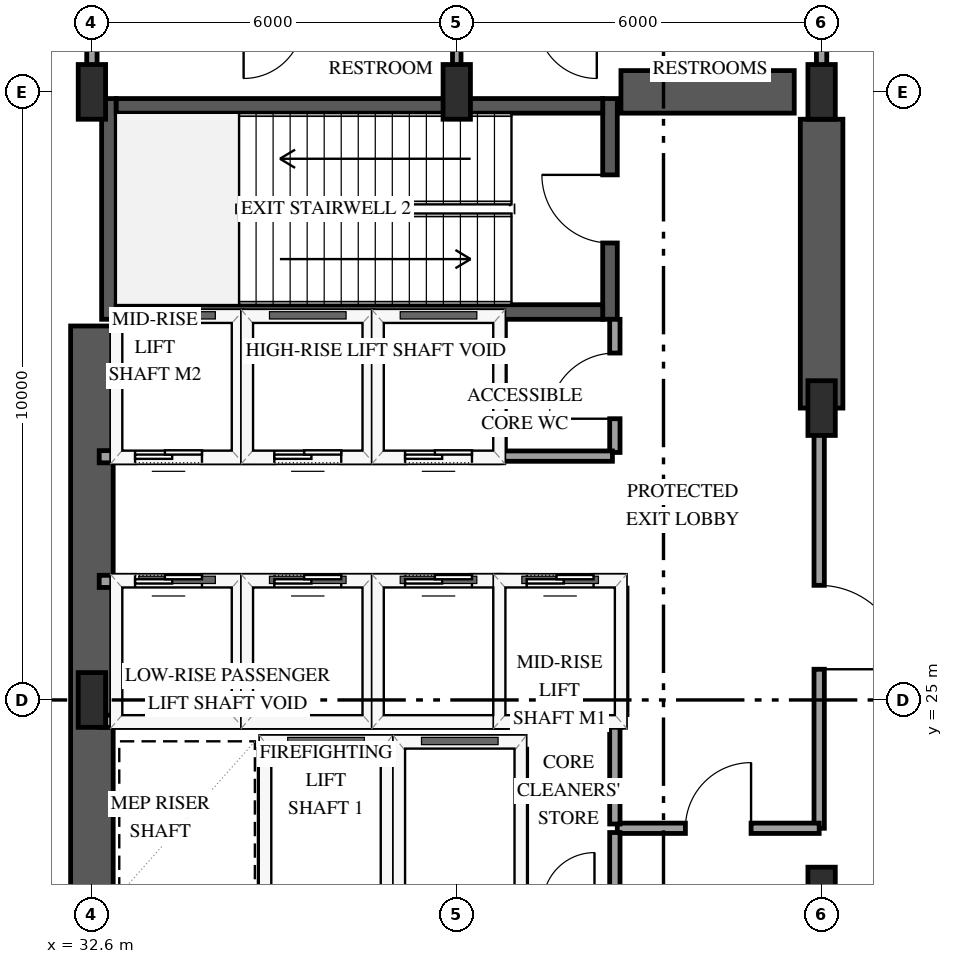
"""IFC4 building model, lengths in metres.
Left out: names, types, materials, properties, quantities, classifications, styles, units other than length and angle.
Written with IfcOpenShell. Run it as: python <this file> out.ifc"""

import sys

from ifc_helpers import new_model, si_unit, direction, frame, frame_2d, origin, origin_2d, place, context, subcontext, project, spatial, rectangle, extrude, element, fill, save


model = new_model("IFC4")
c1 = context("Model", 3, precision=1e-05, world=origin(), true_north=direction((0.0, 1.0)))
c2 = subcontext(c1, "Body", "Model", "MODEL_VIEW")
j1 = project(units=[si_unit("LENGTHUNIT", "METRE"), si_unit("PLANEANGLEUNIT", "RADIAN")], contexts=[c1])
p1 = place(None, origin())
s1 = spatial("IfcSite", under=j1, at=p1, CompositionType="ELEMENT")
p2 = place(p1, origin())
s2 = spatial("IfcBuilding", under=s1, at=p2, CompositionType="ELEMENT")
p3 = place(p2, origin())
s3 = spatial("IfcBuildingStorey", under=s2, at=p3, CompositionType="ELEMENT", Elevation=0.0)
p4 = place(p3, frame((32.88, 31.26, 0.0), z_axis=(0.0, 0.0, 1.0), x_axis=(0.0, 1.0, 0.0)))
e1 = element("IfcWall", 1, at=p4, inside=s3, PredefinedType="SHEAR", context=c2, shape_type="SweptSolid", body=[
    extrude(rectangle(XDim=3.63, YDim=0.24, at=frame_2d((1.815, 0.0))), origin(), (0.0, 0.0, 1.0), 6.0),
])
p5 = place(p3, frame((41.12, 31.26, 0.0), z_axis=(0.0, 0.0, 1.0), x_axis=(0.0, 1.0, 0.0)))
e2 = element("IfcWall", 2, at=p5, inside=s3, PredefinedType="SHEAR", context=c2, shape_type="SweptSolid", body=[
    extrude(rectangle(XDim=3.63, YDim=0.24, at=frame_2d((1.815, 0.0))), origin(), (0.0, 0.0, 1.0), 6.0),
])
p6 = place(p5, frame((1.255, 0.0, 0.0)))
e3 = element("IfcOpeningElement", 3, at=p6, cuts=e2, PredefinedType="OPENING", context=c2, shape_type="SweptSolid", body=[
    extrude(rectangle(XDim=1.12, YDim=2.15, at=frame_2d((0.56, 1.075))), frame((0.0, 0.13, 0.0), z_axis=(0.0, -1.0, 0.0), x_axis=(1.0, 0.0, 0.0)), (0.0, 0.0, 1.0), 0.26),
])
for number, where, z_axis, x_axis in (
    (4, (33.0, 31.38, 0.0), (0.0, 0.0, 1.0), (1.0, 0.0, 0.0)),
    (5, (33.0, 34.77, 0.0), (0.0, 0.0, 1.0), (1.0, 0.0, 0.0)),
):
    element("IfcWall", number, at=place(p3, frame(where, z_axis=z_axis, x_axis=x_axis)), inside=s3, PredefinedType="SHEAR", context=c2, shape_type="SweptSolid", body=[
        extrude(rectangle(XDim=8.0, YDim=0.24, at=frame_2d((4.0, 0.0))), origin(), (0.0, 0.0, 1.0), 6.0),
    ])
p7 = place(p3, frame((32.6, 18.85, 0.0), z_axis=(0.0, 0.0, 1.0), x_axis=(0.0, 1.0, 0.0)))
e6 = element("IfcWall", 6, at=p7, inside=s3, PredefinedType="SHEAR", context=c2, shape_type="SweptSolid", body=[
    extrude(rectangle(XDim=12.3, YDim=0.7, at=frame_2d((6.15, 0.0))), origin(), (0.0, 0.0, 1.0), 6.0),
])
p8 = place(p3, frame((41.3, 35.0, 0.0), z_axis=(0.0, 0.0, 1.0), x_axis=(1.0, 0.0, 0.0)))
e7 = element("IfcWall", 7, at=p8, inside=s3, PredefinedType="SHEAR", context=c2, shape_type="SweptSolid", body=[
    extrude(rectangle(XDim=2.85, YDim=0.7, at=frame_2d((1.425, 0.0))), origin(), (0.0, 0.0, 1.0), 6.0),
])
p9 = place(p3, frame((44.6, 29.8, 0.0), z_axis=(0.0, 0.0, 1.0), x_axis=(0.0, 1.0, 0.0)))
e8 = element("IfcWall", 8, at=p9, inside=s3, PredefinedType="SHEAR", context=c2, shape_type="SweptSolid", body=[
    extrude(rectangle(XDim=4.75, YDim=0.7, at=frame_2d((2.375, 0.0))), origin(), (0.0, 0.0, 1.0), 6.0),
])
for number, where, z_axis, x_axis in (
    (9, (32.6, 25.0, 0.0), (0.0, 0.0, 1.0), (1.0, 0.0, 0.0)),
    (10, (32.6, 35.0, 0.0), (0.0, 0.0, 1.0), (1.0, 0.0, 0.0)),
    (11, (38.6, 35.0, 0.0), (0.0, 0.0, 1.0), (1.0, 0.0, 0.0)),
    (12, (44.6, 21.8, 0.0), (0.0, 0.0, 1.0), (1.0, 0.0, 0.0)),
    (13, (44.6, 29.8, 0.0), (0.0, 0.0, 1.0), (1.0, 0.0, 0.0)),
    (14, (44.6, 35.0, 0.0), (0.0, 0.0, 1.0), (1.0, 0.0, 0.0)),
):
    element("IfcColumn", number, at=place(p3, frame(where, z_axis=z_axis, x_axis=x_axis)), inside=s3, PredefinedType="PILASTER", context=c2, shape_type="SweptSolid", body=[
        extrude(rectangle(XDim=0.45, YDim=0.9, at=origin_2d()), origin(), (0.0, 0.0, 1.0), 6.0),
    ])
p10 = place(p3, frame((35.45, 24.3, 0.0), z_axis=(0.0, 0.0, 1.0), x_axis=(1.0, 0.0, 0.0)))
e15 = element("IfcWall", 15, at=p10, inside=s3, PredefinedType="SOLIDWALL", context=c2, shape_type="SweptSolid", body=[
    extrude(rectangle(XDim=2.0, YDim=0.2, at=frame_2d((1.0, 0.0))), origin(), (0.0, 0.0, 1.0), 5.68),
])
for number, where, z_axis, x_axis in (
    (16, (35.45, 21.81, 0.0), (0.0, 0.0, 1.0), (0.0, 1.0, 0.0)),
    (17, (37.45, 21.81, 0.0), (0.0, 0.0, 1.0), (0.0, 1.0, 0.0)),
):
    element("IfcWall", number, at=place(p3, frame(where, z_axis=z_axis, x_axis=x_axis)), inside=s3, PredefinedType="SOLIDWALL", context=c2, shape_type="SweptSolid", body=[
        extrude(rectangle(XDim=2.38, YDim=0.2, at=frame_2d((1.19, 0.0))), origin(), (0.0, 0.0, 1.0), 5.68),
    ])
p11 = place(p3, frame((37.65, 24.3, 0.0), z_axis=(0.0, 0.0, 1.0), x_axis=(1.0, 0.0, 0.0)))
e18 = element("IfcWall", 18, at=p11, inside=s3, PredefinedType="SOLIDWALL", context=c2, shape_type="SweptSolid", body=[
    extrude(rectangle(XDim=2.0, YDim=0.2, at=frame_2d((1.0, 0.0))), origin(), (0.0, 0.0, 1.0), 5.68),
])
p12 = place(p3, frame((39.65, 21.81, 0.0), z_axis=(0.0, 0.0, 1.0), x_axis=(0.0, 1.0, 0.0)))
e19 = element("IfcWall", 19, at=p12, inside=s3, PredefinedType="SOLIDWALL", context=c2, shape_type="SweptSolid", body=[
    extrude(rectangle(XDim=2.38, YDim=0.2, at=frame_2d((1.19, 0.0))), origin(), (0.0, 0.0, 1.0), 5.68),
])
p13 = place(p3, frame((32.72, 24.65, 0.0), z_axis=(0.0, 0.0, 1.0), x_axis=(1.0, 0.0, 0.0)))
e20 = element("IfcWall", 20, at=p13, inside=s3, PredefinedType="SOLIDWALL", context=c2, shape_type="SweptSolid", body=[
    extrude(rectangle(XDim=2.28, YDim=0.2, at=frame_2d((1.14, 0.0))), origin(), (0.0, 0.0, 1.0), 5.68),
])
p14 = place(p3, frame((32.72, 26.95, 0.0), z_axis=(0.0, 0.0, 1.0), x_axis=(1.0, 0.0, 0.0)))
e21 = element("IfcWall", 21, at=p14, inside=s3, PredefinedType="SOLIDWALL", context=c2, shape_type="SweptSolid", body=[
    extrude(rectangle(XDim=2.28, YDim=0.2, at=frame_2d((1.14, 0.0))), origin(), (0.0, 0.0, 1.0), 5.68),
])
p15 = place(p14, frame((0.59, 0.0, 0.0)))
e22 = element("IfcOpeningElement", 22, at=p15, cuts=e21, PredefinedType="OPENING", context=c2, shape_type="SweptSolid", body=[
    extrude(rectangle(XDim=1.1, YDim=2.15, at=frame_2d((0.55, 1.075))), frame((0.0, 0.11, 0.0), z_axis=(0.0, -1.0, 0.0), x_axis=(1.0, 0.0, 0.0)), (0.0, 0.0, 1.0), 0.22),
])
p16 = place(p3, frame((35.0, 24.76, 0.0), z_axis=(0.0, 0.0, 1.0), x_axis=(0.0, 1.0, 0.0)))
e23 = element("IfcWall", 23, at=p16, inside=s3, PredefinedType="SOLIDWALL", context=c2, shape_type="SweptSolid", body=[
    extrude(rectangle(XDim=2.08, YDim=0.2, at=frame_2d((1.04, 0.0))), origin(), (0.0, 0.0, 1.0), 5.68),
])
p17 = place(p3, frame((35.15, 24.65, 0.0), z_axis=(0.0, 0.0, 1.0), x_axis=(1.0, 0.0, 0.0)))
e24 = element("IfcWall", 24, at=p17, inside=s3, PredefinedType="SOLIDWALL", context=c2, shape_type="SweptSolid", body=[
    extrude(rectangle(XDim=2.0, YDim=0.2, at=frame_2d((1.0, 0.0))), origin(), (0.0, 0.0, 1.0), 5.68),
])
p18 = place(p3, frame((35.15, 26.95, 0.0), z_axis=(0.0, 0.0, 1.0), x_axis=(1.0, 0.0, 0.0)))
e25 = element("IfcWall", 25, at=p18, inside=s3, PredefinedType="SOLIDWALL", context=c2, shape_type="SweptSolid", body=[
    extrude(rectangle(XDim=2.0, YDim=0.2, at=frame_2d((1.0, 0.0))), origin(), (0.0, 0.0, 1.0), 5.68),
])
p19 = place(p18, frame((0.45, 0.0, 0.0)))
e26 = element("IfcOpeningElement", 26, at=p19, cuts=e25, PredefinedType="OPENING", context=c2, shape_type="SweptSolid", body=[
    extrude(rectangle(XDim=1.1, YDim=2.15, at=frame_2d((0.55, 1.075))), frame((0.0, 0.11, 0.0), z_axis=(0.0, -1.0, 0.0), x_axis=(1.0, 0.0, 0.0)), (0.0, 0.0, 1.0), 0.22),
])
p20 = place(p3, frame((37.15, 24.76, 0.0), z_axis=(0.0, 0.0, 1.0), x_axis=(0.0, 1.0, 0.0)))
e27 = element("IfcWall", 27, at=p20, inside=s3, PredefinedType="SOLIDWALL", context=c2, shape_type="SweptSolid", body=[
    extrude(rectangle(XDim=2.08, YDim=0.2, at=frame_2d((1.04, 0.0))), origin(), (0.0, 0.0, 1.0), 5.68),
])
p21 = place(p3, frame((37.3, 24.65, 0.0), z_axis=(0.0, 0.0, 1.0), x_axis=(1.0, 0.0, 0.0)))
e28 = element("IfcWall", 28, at=p21, inside=s3, PredefinedType="SOLIDWALL", context=c2, shape_type="SweptSolid", body=[
    extrude(rectangle(XDim=2.0, YDim=0.2, at=frame_2d((1.0, 0.0))), origin(), (0.0, 0.0, 1.0), 5.68),
])
p22 = place(p3, frame((37.3, 26.95, 0.0), z_axis=(0.0, 0.0, 1.0), x_axis=(1.0, 0.0, 0.0)))
e29 = element("IfcWall", 29, at=p22, inside=s3, PredefinedType="SOLIDWALL", context=c2, shape_type="SweptSolid", body=[
    extrude(rectangle(XDim=2.0, YDim=0.2, at=frame_2d((1.0, 0.0))), origin(), (0.0, 0.0, 1.0), 5.68),
])
p23 = place(p22, frame((0.45, 0.0, 0.0)))
e30 = element("IfcOpeningElement", 30, at=p23, cuts=e29, PredefinedType="OPENING", context=c2, shape_type="SweptSolid", body=[
    extrude(rectangle(XDim=1.1, YDim=2.15, at=frame_2d((0.55, 1.075))), frame((0.0, 0.11, 0.0), z_axis=(0.0, -1.0, 0.0), x_axis=(1.0, 0.0, 0.0)), (0.0, 0.0, 1.0), 0.22),
])
p24 = place(p3, frame((39.3, 24.76, 0.0), z_axis=(0.0, 0.0, 1.0), x_axis=(0.0, 1.0, 0.0)))
e31 = element("IfcWall", 31, at=p24, inside=s3, PredefinedType="SOLIDWALL", context=c2, shape_type="SweptSolid", body=[
    extrude(rectangle(XDim=2.08, YDim=0.2, at=frame_2d((1.04, 0.0))), origin(), (0.0, 0.0, 1.0), 5.68),
])
p25 = place(p3, frame((39.3, 24.65, 0.0), z_axis=(0.0, 0.0, 1.0), x_axis=(1.0, 0.0, 0.0)))
e32 = element("IfcWall", 32, at=p25, inside=s3, PredefinedType="SOLIDWALL", context=c2, shape_type="SweptSolid", body=[
    extrude(rectangle(XDim=2.0, YDim=0.2, at=frame_2d((1.0, 0.0))), origin(), (0.0, 0.0, 1.0), 5.68),
])
p26 = place(p3, frame((39.3, 26.95, 0.0), z_axis=(0.0, 0.0, 1.0), x_axis=(1.0, 0.0, 0.0)))
e33 = element("IfcWall", 33, at=p26, inside=s3, PredefinedType="SOLIDWALL", context=c2, shape_type="SweptSolid", body=[
    extrude(rectangle(XDim=2.0, YDim=0.2, at=frame_2d((1.0, 0.0))), origin(), (0.0, 0.0, 1.0), 5.68),
])
p27 = place(p26, frame((0.45, 0.0, 0.0)))
e34 = element("IfcOpeningElement", 34, at=p27, cuts=e33, PredefinedType="OPENING", context=c2, shape_type="SweptSolid", body=[
    extrude(rectangle(XDim=1.1, YDim=2.15, at=frame_2d((0.55, 1.075))), frame((0.0, 0.11, 0.0), z_axis=(0.0, -1.0, 0.0), x_axis=(1.0, 0.0, 0.0)), (0.0, 0.0, 1.0), 0.22),
])
p28 = place(p3, frame((41.3, 24.76, 0.0), z_axis=(0.0, 0.0, 1.0), x_axis=(0.0, 1.0, 0.0)))
e35 = element("IfcWall", 35, at=p28, inside=s3, PredefinedType="SOLIDWALL", context=c2, shape_type="SweptSolid", body=[
    extrude(rectangle(XDim=2.08, YDim=0.2, at=frame_2d((1.04, 0.0))), origin(), (0.0, 0.0, 1.0), 5.68),
])
p29 = place(p3, frame((32.72, 29.0, 0.0), z_axis=(0.0, 0.0, 1.0), x_axis=(1.0, 0.0, 0.0)))
e36 = element("IfcWall", 36, at=p29, inside=s3, PredefinedType="SOLIDWALL", context=c2, shape_type="SweptSolid", body=[
    extrude(rectangle(XDim=2.28, YDim=0.2, at=frame_2d((1.14, 0.0))), origin(), (0.0, 0.0, 1.0), 5.68),
])
p30 = place(p29, frame((0.59, 0.0, 0.0)))
e37 = element("IfcOpeningElement", 37, at=p30, cuts=e36, PredefinedType="OPENING", context=c2, shape_type="SweptSolid", body=[
    extrude(rectangle(XDim=1.1, YDim=2.15, at=frame_2d((0.55, 1.075))), frame((0.0, 0.11, 0.0), z_axis=(0.0, -1.0, 0.0), x_axis=(1.0, 0.0, 0.0)), (0.0, 0.0, 1.0), 0.22),
])
p31 = place(p3, frame((35.0, 29.11, 0.0), z_axis=(0.0, 0.0, 1.0), x_axis=(0.0, 1.0, 0.0)))
e38 = element("IfcWall", 38, at=p31, inside=s3, PredefinedType="SOLIDWALL", context=c2, shape_type="SweptSolid", body=[
    extrude(rectangle(XDim=2.1, YDim=0.2, at=frame_2d((1.05, 0.0))), origin(), (0.0, 0.0, 1.0), 5.68),
])
p32 = place(p3, frame((35.15, 29.0, 0.0), z_axis=(0.0, 0.0, 1.0), x_axis=(1.0, 0.0, 0.0)))
e39 = element("IfcWall", 39, at=p32, inside=s3, PredefinedType="SOLIDWALL", context=c2, shape_type="SweptSolid", body=[
    extrude(rectangle(XDim=2.0, YDim=0.2, at=frame_2d((1.0, 0.0))), origin(), (0.0, 0.0, 1.0), 5.68),
])
p33 = place(p32, frame((0.45, 0.0, 0.0)))
e40 = element("IfcOpeningElement", 40, at=p33, cuts=e39, PredefinedType="OPENING", context=c2, shape_type="SweptSolid", body=[
    extrude(rectangle(XDim=1.1, YDim=2.15, at=frame_2d((0.55, 1.075))), frame((0.0, 0.11, 0.0), z_axis=(0.0, -1.0, 0.0), x_axis=(1.0, 0.0, 0.0)), (0.0, 0.0, 1.0), 0.22),
])
p34 = place(p3, frame((37.15, 29.11, 0.0), z_axis=(0.0, 0.0, 1.0), x_axis=(0.0, 1.0, 0.0)))
e41 = element("IfcWall", 41, at=p34, inside=s3, PredefinedType="SOLIDWALL", context=c2, shape_type="SweptSolid", body=[
    extrude(rectangle(XDim=2.1, YDim=0.2, at=frame_2d((1.05, 0.0))), origin(), (0.0, 0.0, 1.0), 5.68),
])
p35 = place(p3, frame((37.3, 29.0, 0.0), z_axis=(0.0, 0.0, 1.0), x_axis=(1.0, 0.0, 0.0)))
e42 = element("IfcWall", 42, at=p35, inside=s3, PredefinedType="SOLIDWALL", context=c2, shape_type="SweptSolid", body=[
    extrude(rectangle(XDim=2.0, YDim=0.2, at=frame_2d((1.0, 0.0))), origin(), (0.0, 0.0, 1.0), 5.68),
])
p36 = place(p35, frame((0.45, 0.0, 0.0)))
e43 = element("IfcOpeningElement", 43, at=p36, cuts=e42, PredefinedType="OPENING", context=c2, shape_type="SweptSolid", body=[
    extrude(rectangle(XDim=1.1, YDim=2.15, at=frame_2d((0.55, 1.075))), frame((0.0, 0.11, 0.0), z_axis=(0.0, -1.0, 0.0), x_axis=(1.0, 0.0, 0.0)), (0.0, 0.0, 1.0), 0.22),
])
p37 = place(p3, frame((39.3, 29.11, 0.0), z_axis=(0.0, 0.0, 1.0), x_axis=(0.0, 1.0, 0.0)))
e44 = element("IfcWall", 44, at=p37, inside=s3, PredefinedType="SOLIDWALL", context=c2, shape_type="SweptSolid", body=[
    extrude(rectangle(XDim=2.1, YDim=0.2, at=frame_2d((1.05, 0.0))), origin(), (0.0, 0.0, 1.0), 5.68),
])
p38 = place(p3, frame((44.56, 29.8, 0.0), z_axis=(0.0, 0.0, 1.0), x_axis=(0.0, -1.0, 0.0)))
e45 = element("IfcWall", 45, at=p38, inside=s3, PredefinedType="PARTITIONING", context=c2, shape_type="SweptSolid", body=[
    extrude(rectangle(XDim=6.91, YDim=0.17, at=frame_2d((3.455, 0.0))), origin(), (0.0, 0.0, 1.0), 4.72),
])
p39 = place(p38, frame((2.915, 0.0, 0.0)))
e46 = element("IfcOpeningElement", 46, at=p39, cuts=e45, PredefinedType="OPENING", context=c2, shape_type="SweptSolid", body=[
    extrude(rectangle(XDim=1.38, YDim=2.2, at=frame_2d((0.69, 1.1))), frame((0.0, 0.095, 0.0), z_axis=(0.0, -1.0, 0.0), x_axis=(1.0, 0.0, 0.0)), (0.0, 0.0, 1.0), 0.19),
])
p40 = place(p3, frame((41.24, 22.89, 0.0), z_axis=(0.0, 0.0, 1.0), x_axis=(1.0, 0.0, 0.0)))
e47 = element("IfcWall", 47, at=p40, inside=s3, PredefinedType="PARTITIONING", context=c2, shape_type="SweptSolid", body=[
    extrude(rectangle(XDim=3.32, YDim=0.17, at=frame_2d((1.66, 0.0))), origin(), (0.0, 0.0, 1.0), 5.68),
])
p41 = place(p40, frame((1.12, 0.0, 0.0)))
e48 = element("IfcOpeningElement", 48, at=p41, cuts=e47, PredefinedType="OPENING", context=c2, shape_type="SweptSolid", body=[
    extrude(rectangle(XDim=1.08, YDim=2.15, at=frame_2d((0.54, 1.075))), frame((0.0, 0.095, 0.0), z_axis=(0.0, -1.0, 0.0), x_axis=(1.0, 0.0, 0.0)), (0.0, 0.0, 1.0), 0.19),
])
p42 = place(p3, frame((41.2, 29.07, 0.0), z_axis=(0.0, 0.0, 1.0), x_axis=(0.0, 1.0, 0.0)))
e49 = element("IfcWall", 49, at=p42, inside=s3, PredefinedType="PARTITIONING", context=c2, shape_type="SweptSolid", body=[
    extrude(rectangle(XDim=2.19, YDim=0.17, at=frame_2d((1.095, 0.0))), origin(), (0.0, 0.0, 1.0), 5.68),
])
p43 = place(p42, frame((0.555, 0.0, 0.0)))
e50 = element("IfcOpeningElement", 50, at=p43, cuts=e49, PredefinedType="OPENING", context=c2, shape_type="SweptSolid", body=[
    extrude(rectangle(XDim=1.08, YDim=2.15, at=frame_2d((0.54, 1.075))), frame((0.0, 0.095, 0.0), z_axis=(0.0, -1.0, 0.0), x_axis=(1.0, 0.0, 0.0)), (0.0, 0.0, 1.0), 0.19),
])
p44 = place(p3, frame((39.3, 29.01, 0.0), z_axis=(0.0, 0.0, 1.0), x_axis=(1.0, 0.0, 0.0)))
e51 = element("IfcWall", 51, at=p44, inside=s3, PredefinedType="PARTITIONING", context=c2, shape_type="SweptSolid", body=[
    extrude(rectangle(XDim=1.86, YDim=0.17, at=frame_2d((0.93, 0.0))), origin(), (0.0, 0.0, 1.0), 5.68),
])
p45 = place(p3, frame((41.2, 22.96, 0.0), z_axis=(0.0, 0.0, 1.0), x_axis=(0.0, 1.0, 0.0)))
e52 = element("IfcWall", 52, at=p45, inside=s3, PredefinedType="PARTITIONING", context=c2, shape_type="SweptSolid", body=[
    extrude(rectangle(XDim=1.69, YDim=0.17, at=frame_2d((0.845, 0.0))), origin(), (0.0, 0.0, 1.0), 5.68),
])
p46 = place(p3, frame((41.2, 21.7, 0.0), z_axis=(0.0, 0.0, 1.0), x_axis=(0.0, 1.0, 0.0)))
e53 = element("IfcWall", 53, at=p46, inside=s3, PredefinedType="PARTITIONING", context=c2, shape_type="SweptSolid", body=[
    extrude(rectangle(XDim=1.12, YDim=0.17, at=frame_2d((0.56, 0.0))), origin(), (0.0, 0.0, 1.0), 5.68),
])
for number, where, z_axis, x_axis in (
    (54, (32.6, 36.13, 0.0), (0.0, 0.0, 1.0), (0.0, -1.0, 0.0)),
    (55, (44.6, 35.07, 0.0), (0.0, 0.0, 1.0), (0.0, 1.0, 0.0)),
):
    element("IfcWall", number, at=place(p3, frame(where, z_axis=z_axis, x_axis=x_axis)), inside=s3, PredefinedType="PARTITIONING", context=c2, shape_type="SweptSolid", body=[
        extrude(rectangle(XDim=1.06, YDim=0.17, at=frame_2d((0.53, 0.0))), origin(), (0.0, 0.0, 1.0), 4.802),
    ])
p47 = place(p3, frame((38.6, 36.13, 0.0), z_axis=(0.0, 0.0, 1.0), x_axis=(0.0, -1.0, 0.0)))
e56 = element("IfcWall", 56, at=p47, inside=s3, PredefinedType="PARTITIONING", context=c2, shape_type="SweptSolid", body=[
    extrude(rectangle(XDim=1.06, YDim=0.14, at=frame_2d((0.53, 0.0))), origin(), (0.0, 0.0, 1.0), 5.68),
])
p48 = place(p15, origin())
e57 = element("IfcDoor", 57, at=p48, inside=s3, OperationType="SLIDING_TO_LEFT", PredefinedType="DOOR", context=c2, shape_type="SweptSolid", body=[
    extrude(rectangle(XDim=1.1, YDim=2.15, at=frame_2d((0.55, 1.075))), frame((0.0, 0.025, 0.0), z_axis=(0.0, -1.0, 0.0), x_axis=(1.0, 0.0, 0.0)), (0.0, 0.0, 1.0), 0.05),
])
fill(e22, e57)
p49 = place(p19, origin())
e58 = element("IfcDoor", 58, at=p49, inside=s3, OperationType="SLIDING_TO_LEFT", PredefinedType="DOOR", context=c2, shape_type="SweptSolid", body=[
    extrude(rectangle(XDim=1.1, YDim=2.15, at=frame_2d((0.55, 1.075))), frame((0.0, 0.025, 0.0), z_axis=(0.0, -1.0, 0.0), x_axis=(1.0, 0.0, 0.0)), (0.0, 0.0, 1.0), 0.05),
])
fill(e26, e58)
p50 = place(p23, origin())
e59 = element("IfcDoor", 59, at=p50, inside=s3, OperationType="SLIDING_TO_LEFT", PredefinedType="DOOR", context=c2, shape_type="SweptSolid", body=[
    extrude(rectangle(XDim=1.1, YDim=2.15, at=frame_2d((0.55, 1.075))), frame((0.0, 0.025, 0.0), z_axis=(0.0, -1.0, 0.0), x_axis=(1.0, 0.0, 0.0)), (0.0, 0.0, 1.0), 0.05),
])
fill(e30, e59)
p51 = place(p27, origin())
e60 = element("IfcDoor", 60, at=p51, inside=s3, OperationType="SLIDING_TO_LEFT", PredefinedType="DOOR", context=c2, shape_type="SweptSolid", body=[
    extrude(rectangle(XDim=1.1, YDim=2.15, at=frame_2d((0.55, 1.075))), frame((0.0, 0.025, 0.0), z_axis=(0.0, -1.0, 0.0), x_axis=(1.0, 0.0, 0.0)), (0.0, 0.0, 1.0), 0.05),
])
fill(e34, e60)
p52 = place(p30, origin())
e61 = element("IfcDoor", 61, at=p52, inside=s3, OperationType="SLIDING_TO_LEFT", PredefinedType="DOOR", context=c2, shape_type="SweptSolid", body=[
    extrude(rectangle(XDim=1.1, YDim=2.15, at=frame_2d((0.55, 1.075))), frame((0.0, 0.025, 0.0), z_axis=(0.0, -1.0, 0.0), x_axis=(1.0, 0.0, 0.0)), (0.0, 0.0, 1.0), 0.05),
])
fill(e37, e61)
p53 = place(p33, origin())
e62 = element("IfcDoor", 62, at=p53, inside=s3, OperationType="SLIDING_TO_LEFT", PredefinedType="DOOR", context=c2, shape_type="SweptSolid", body=[
    extrude(rectangle(XDim=1.1, YDim=2.15, at=frame_2d((0.55, 1.075))), frame((0.0, 0.025, 0.0), z_axis=(0.0, -1.0, 0.0), x_axis=(1.0, 0.0, 0.0)), (0.0, 0.0, 1.0), 0.05),
])
fill(e40, e62)
p54 = place(p36, origin())
e63 = element("IfcDoor", 63, at=p54, inside=s3, OperationType="SLIDING_TO_LEFT", PredefinedType="DOOR", context=c2, shape_type="SweptSolid", body=[
    extrude(rectangle(XDim=1.1, YDim=2.15, at=frame_2d((0.55, 1.075))), frame((0.0, 0.025, 0.0), z_axis=(0.0, -1.0, 0.0), x_axis=(1.0, 0.0, 0.0)), (0.0, 0.0, 1.0), 0.05),
])
fill(e43, e63)
p55 = place(p6, origin())
e64 = element("IfcDoor", 64, at=p55, inside=s3, OperationType="SINGLE_SWING_RIGHT", PredefinedType="DOOR", context=c2, shape_type="SweptSolid", body=[
    extrude(rectangle(XDim=1.12, YDim=2.15, at=frame_2d((0.56, 1.075))), frame((0.0, 0.025, 0.0), z_axis=(0.0, -1.0, 0.0), x_axis=(1.0, 0.0, 0.0)), (0.0, 0.0, 1.0), 0.05),
])
fill(e3, e64)
p56 = place(p39, origin())
e65 = element("IfcDoor", 65, at=p56, inside=s3, OperationType="SINGLE_SWING_RIGHT", PredefinedType="DOOR", context=c2, shape_type="SweptSolid", body=[
    extrude(rectangle(XDim=1.38, YDim=2.2, at=frame_2d((0.69, 1.1))), frame((0.0, 0.025, 0.0), z_axis=(0.0, -1.0, 0.0), x_axis=(1.0, 0.0, 0.0)), (0.0, 0.0, 1.0), 0.05),
])
fill(e46, e65)
p57 = place(p41, origin())
e66 = element("IfcDoor", 66, at=p57, inside=s3, OperationType="SINGLE_SWING_RIGHT", PredefinedType="DOOR", context=c2, shape_type="SweptSolid", body=[
    extrude(rectangle(XDim=1.08, YDim=2.15, at=frame_2d((0.54, 1.075))), frame((0.0, 0.025, 0.0), z_axis=(0.0, -1.0, 0.0), x_axis=(1.0, 0.0, 0.0)), (0.0, 0.0, 1.0), 0.05),
])
fill(e48, e66)
p58 = place(p43, origin())
e67 = element("IfcDoor", 67, at=p58, inside=s3, OperationType="SINGLE_SWING_LEFT", PredefinedType="DOOR", context=c2, shape_type="SweptSolid", body=[
    extrude(rectangle(XDim=1.08, YDim=2.15, at=frame_2d((0.54, 1.075))), frame((0.0, 0.025, 0.0), z_axis=(0.0, -1.0, 0.0), x_axis=(1.0, 0.0, 0.0)), (0.0, 0.0, 1.0), 0.05),
])
fill(e50, e67)
save(model, sys.argv[1])
